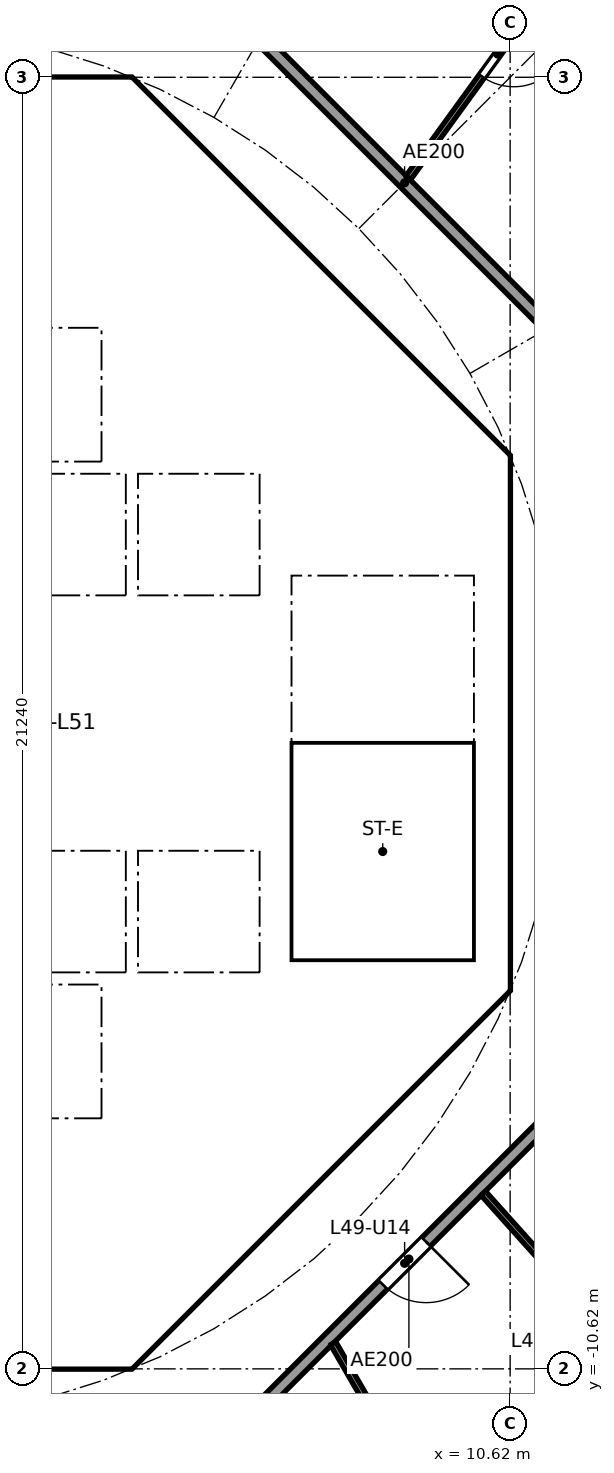
"""IFC4 building model, lengths in metres.
Left out: names, types, materials, properties, quantities, classifications, styles, units other than length and angle.
Written with IfcOpenShell. Run it as: python <this file> out.ifc"""

import sys

from ifc_helpers import new_model, si_unit, direction, frame, frame_2d, origin, place, context, subcontext, project, spatial, polyline, rectangle, outline, extrude, element, fill, save


model = new_model("IFC4")
c1 = context("Model", 3, precision=1e-05, world=origin(), true_north=direction((0.0, 1.0)))
c2 = subcontext(c1, "Body", "Model", "MODEL_VIEW")
j1 = project(units=[si_unit("LENGTHUNIT", "METRE"), si_unit("PLANEANGLEUNIT", "RADIAN")], contexts=[c1])
p1 = place(None, origin())
s1 = spatial("IfcSite", under=j1, at=p1, CompositionType="ELEMENT")
p2 = place(p1, origin())
s2 = spatial("IfcBuilding", under=s1, at=p2, CompositionType="ELEMENT")
p3 = place(p2, frame((0.0, 0.0, 195.5)))
s3 = spatial("IfcBuildingStorey", under=s2, at=p3, CompositionType="ELEMENT", Elevation=195.5)
p4 = place(p3, frame((9.988, 4.613, 0.0), z_axis=(0.0, 0.0, 1.0), x_axis=(-0.707106781187, 0.707106781187, 0.0)))
e1 = element("IfcWall", 1, at=p4, inside=s3, PredefinedType="SHEAR", context=c2, shape_type="SweptSolid", body=[
    extrude(rectangle(XDim=7.602, YDim=0.6, at=frame_2d((3.801, 0.0))), origin(), (0.0, 0.0, 1.0), 3.44),
])
p5 = place(p4, frame((3.201, 0.0, 0.0)))
e2 = element("IfcOpeningElement", 2, at=p5, cuts=e1, PredefinedType="OPENING", context=c2, shape_type="SweptSolid", body=[
    extrude(rectangle(XDim=1.2, YDim=2.1, at=frame_2d((0.6, 1.05))), frame((0.0, 0.31, 0.0), z_axis=(0.0, -1.0, 0.0), x_axis=(1.0, 0.0, 0.0)), (0.0, 0.0, 1.0), 0.62),
])
p6 = place(p3, frame((4.613, -9.988, 0.0), z_axis=(0.0, 0.0, 1.0), x_axis=(0.707106781187, 0.707106781187, 0.0)))
e3 = element("IfcWall", 3, at=p6, inside=s3, PredefinedType="SHEAR", context=c2, shape_type="SweptSolid", body=[
    extrude(rectangle(XDim=7.602, YDim=0.6, at=frame_2d((3.801, 0.0))), origin(), (0.0, 0.0, 1.0), 3.44),
])
p7 = place(p6, frame((3.201, 0.0, 0.0)))
e4 = element("IfcOpeningElement", 4, at=p7, cuts=e3, PredefinedType="OPENING", context=c2, shape_type="SweptSolid", body=[
    extrude(rectangle(XDim=1.2, YDim=2.1, at=frame_2d((0.6, 1.05))), frame((0.0, 0.31, 0.0), z_axis=(0.0, -1.0, 0.0), x_axis=(1.0, 0.0, 0.0)), (0.0, 0.0, 1.0), 0.62),
])
p8 = place(p3, frame((4.0, 4.3, 0.0), z_axis=(0.0, 0.0, 1.0), x_axis=(0.0, 1.0, 0.0)))
e5 = element("IfcWall", 5, at=p8, inside=s3, PredefinedType="SOLIDWALL", context=c2, shape_type="SweptSolid", body=[
    extrude(rectangle(XDim=2.2, YDim=0.2, at=frame_2d((1.1, 0.0))), origin(), (0.0, 0.0, 1.0), 3.44),
])
p9 = place(p8, frame((0.55, 0.0, 0.0)))
e6 = element("IfcOpeningElement", 6, at=p9, cuts=e5, PredefinedType="OPENING", context=c2, shape_type="SweptSolid", body=[
    extrude(rectangle(XDim=1.1, YDim=2.1, at=frame_2d((0.55, 1.05))), frame((0.0, 0.11, 0.0), z_axis=(0.0, -1.0, 0.0), x_axis=(1.0, 0.0, 0.0)), (0.0, 0.0, 1.0), 0.22),
])
p10 = place(p3, frame((-6.7, 2.0, 0.0), z_axis=(0.0, 0.0, 1.0), x_axis=(1.0, 0.0, 0.0)))
e7 = element("IfcWall", 7, at=p10, inside=s3, PredefinedType="SOLIDWALL", context=c2, shape_type="SweptSolid", body=[
    extrude(rectangle(XDim=13.4, YDim=0.2, at=frame_2d((6.7, 0.0))), origin(), (0.0, 0.0, 1.0), 3.44),
])
p11 = place(p10, frame((7.25, 0.0, 0.0)))
e8 = element("IfcOpeningElement", 8, at=p11, cuts=e7, PredefinedType="OPENING", context=c2, shape_type="SweptSolid", body=[
    extrude(rectangle(XDim=1.1, YDim=2.1, at=frame_2d((0.55, 1.05))), frame((0.0, 0.11, 0.0), z_axis=(0.0, -1.0, 0.0), x_axis=(1.0, 0.0, 0.0)), (0.0, 0.0, 1.0), 0.22),
])
p12 = place(p10, frame((9.45, 0.0, 0.0)))
e9 = element("IfcOpeningElement", 9, at=p12, cuts=e7, PredefinedType="OPENING", context=c2, shape_type="SweptSolid", body=[
    extrude(rectangle(XDim=1.1, YDim=2.1, at=frame_2d((0.55, 1.05))), frame((0.0, 0.11, 0.0), z_axis=(0.0, -1.0, 0.0), x_axis=(1.0, 0.0, 0.0)), (0.0, 0.0, 1.0), 0.22),
])
p13 = place(p10, frame((2.95, 0.0, 0.0)))
e10 = element("IfcOpeningElement", 10, at=p13, cuts=e7, PredefinedType="OPENING", context=c2, shape_type="SweptSolid", body=[
    extrude(rectangle(XDim=0.9, YDim=2.1, at=frame_2d((0.45, 1.05))), frame((0.0, 0.11, 0.0), z_axis=(0.0, -1.0, 0.0), x_axis=(1.0, 0.0, 0.0)), (0.0, 0.0, 1.0), 0.22),
])
p14 = place(p3, frame((6.7, 4.0, 0.0), z_axis=(0.0, 0.0, 1.0), x_axis=(1.0, 0.0, 0.0)))
e11 = element("IfcWall", 11, at=p14, inside=s3, PredefinedType="SOLIDWALL", context=c2, shape_type="SweptSolid", body=[
    extrude(rectangle(XDim=3.325, YDim=0.2, at=frame_2d((1.662, 0.0))), origin(), (0.0, 0.0, 1.0), 3.44),
])
p15 = place(p14, frame((1.25, 0.0, 0.0)))
e12 = element("IfcOpeningElement", 12, at=p15, cuts=e11, PredefinedType="OPENING", context=c2, shape_type="SweptSolid", body=[
    extrude(rectangle(XDim=1.1, YDim=2.1, at=frame_2d((0.55, 1.05))), frame((0.0, 0.11, 0.0), z_axis=(0.0, -1.0, 0.0), x_axis=(1.0, 0.0, 0.0)), (0.0, 0.0, 1.0), 0.22),
])
p16 = place(p3, frame((4.0, 7.025, 0.0), z_axis=(0.0, 0.0, 1.0), x_axis=(0.0, 1.0, 0.0)))
e13 = element("IfcWall", 13, at=p16, inside=s3, PredefinedType="SOLIDWALL", context=c2, shape_type="SweptSolid", body=[
    extrude(rectangle(XDim=3.0, YDim=0.2, at=frame_2d((1.5, 0.0))), origin(), (0.0, 0.0, 1.0), 3.44),
])
p17 = place(p16, frame((0.925, 0.0, 0.0)))
e14 = element("IfcOpeningElement", 14, at=p17, cuts=e13, PredefinedType="OPENING", context=c2, shape_type="SweptSolid", body=[
    extrude(rectangle(XDim=1.1, YDim=2.1, at=frame_2d((0.55, 1.05))), frame((0.0, 0.11, 0.0), z_axis=(0.0, -1.0, 0.0), x_axis=(1.0, 0.0, 0.0)), (0.0, 0.0, 1.0), 0.22),
])
p18 = place(p3, frame((4.0, -10.025, 0.0), z_axis=(0.0, 0.0, 1.0), x_axis=(0.0, 1.0, 0.0)))
e15 = element("IfcWall", 15, at=p18, inside=s3, PredefinedType="SOLIDWALL", context=c2, shape_type="SweptSolid", body=[
    extrude(rectangle(XDim=3.0, YDim=0.2, at=frame_2d((1.5, 0.0))), origin(), (0.0, 0.0, 1.0), 3.44),
])
p19 = place(p18, frame((0.975, 0.0, 0.0)))
e16 = element("IfcOpeningElement", 16, at=p19, cuts=e15, PredefinedType="OPENING", context=c2, shape_type="SweptSolid", body=[
    extrude(rectangle(XDim=1.1, YDim=2.1, at=frame_2d((0.55, 1.05))), frame((0.0, 0.11, 0.0), z_axis=(0.0, -1.0, 0.0), x_axis=(1.0, 0.0, 0.0)), (0.0, 0.0, 1.0), 0.22),
])
p20 = place(p3, frame((4.0, -6.5, 0.0), z_axis=(0.0, 0.0, 1.0), x_axis=(0.0, 1.0, 0.0)))
e17 = element("IfcWall", 17, at=p20, inside=s3, PredefinedType="SOLIDWALL", context=c2, shape_type="SweptSolid", body=[
    extrude(rectangle(XDim=2.2, YDim=0.2, at=frame_2d((1.1, 0.0))), origin(), (0.0, 0.0, 1.0), 3.44),
])
p21 = place(p20, frame((0.55, 0.0, 0.0)))
e18 = element("IfcOpeningElement", 18, at=p21, cuts=e17, PredefinedType="OPENING", context=c2, shape_type="SweptSolid", body=[
    extrude(rectangle(XDim=1.1, YDim=2.1, at=frame_2d((0.55, 1.05))), frame((0.0, 0.11, 0.0), z_axis=(0.0, -1.0, 0.0), x_axis=(1.0, 0.0, 0.0)), (0.0, 0.0, 1.0), 0.22),
])
p22 = place(p3, frame((-6.7, -2.0, 0.0), z_axis=(0.0, 0.0, 1.0), x_axis=(1.0, 0.0, 0.0)))
e19 = element("IfcWall", 19, at=p22, inside=s3, PredefinedType="SOLIDWALL", context=c2, shape_type="SweptSolid", body=[
    extrude(rectangle(XDim=13.4, YDim=0.2, at=frame_2d((6.7, 0.0))), origin(), (0.0, 0.0, 1.0), 3.44),
])
p23 = place(p22, frame((5.05, 0.0, 0.0)))
e20 = element("IfcOpeningElement", 20, at=p23, cuts=e19, PredefinedType="OPENING", context=c2, shape_type="SweptSolid", body=[
    extrude(rectangle(XDim=1.1, YDim=2.1, at=frame_2d((0.55, 1.05))), frame((0.0, 0.11, 0.0), z_axis=(0.0, -1.0, 0.0), x_axis=(1.0, 0.0, 0.0)), (0.0, 0.0, 1.0), 0.22),
])
p24 = place(p22, frame((7.25, 0.0, 0.0)))
e21 = element("IfcOpeningElement", 21, at=p24, cuts=e19, PredefinedType="OPENING", context=c2, shape_type="SweptSolid", body=[
    extrude(rectangle(XDim=1.1, YDim=2.1, at=frame_2d((0.55, 1.05))), frame((0.0, 0.11, 0.0), z_axis=(0.0, -1.0, 0.0), x_axis=(1.0, 0.0, 0.0)), (0.0, 0.0, 1.0), 0.22),
])
p25 = place(p22, frame((0.75, 0.0, 0.0)))
e22 = element("IfcOpeningElement", 22, at=p25, cuts=e19, PredefinedType="OPENING", context=c2, shape_type="SweptSolid", body=[
    extrude(rectangle(XDim=0.9, YDim=2.1, at=frame_2d((0.45, 1.05))), frame((0.0, 0.11, 0.0), z_axis=(0.0, -1.0, 0.0), x_axis=(1.0, 0.0, 0.0)), (0.0, 0.0, 1.0), 0.22),
])
p26 = place(p22, frame((2.95, 0.0, 0.0)))
e23 = element("IfcOpeningElement", 23, at=p26, cuts=e19, PredefinedType="OPENING", context=c2, shape_type="SweptSolid", body=[
    extrude(rectangle(XDim=0.9, YDim=2.1, at=frame_2d((0.45, 1.05))), frame((0.0, 0.11, 0.0), z_axis=(0.0, -1.0, 0.0), x_axis=(1.0, 0.0, 0.0)), (0.0, 0.0, 1.0), 0.22),
])
p27 = place(p3, origin())
e24 = element("IfcWall", 24, at=p27, inside=s3, PredefinedType="SHEAR", context=c2, shape_type="SweptSolid", body=[
    extrude(outline(polyline([(-4.152, -10.025), (4.152, -10.025), (4.401, -9.776), (4.825, -10.2), (4.401, -10.625), (-4.401, -10.625), (-4.825, -10.2), (-4.401, -9.776), (-4.152, -10.025)])), origin(), (0.0, 0.0, 1.0), 3.44),
])
p28 = place(p3, origin())
e25 = element("IfcWall", 25, at=p28, inside=s3, PredefinedType="SHEAR", context=c2, shape_type="SweptSolid", body=[
    extrude(outline(polyline([(-4.152, 10.025), (-4.401, 9.776), (-4.825, 10.2), (-4.401, 10.625), (4.401, 10.625), (4.825, 10.2), (4.401, 9.776), (4.152, 10.025), (-4.152, 10.025)])), origin(), (0.0, 0.0, 1.0), 3.44),
])
p29 = place(p3, origin())
e26 = element("IfcWall", 26, at=p29, inside=s3, PredefinedType="SHEAR", context=c2, shape_type="SweptSolid", body=[
    extrude(outline(polyline([(9.776, -4.401), (10.025, -4.152), (10.025, -3.801), (10.025, 4.152), (9.776, 4.401), (10.2, 4.825), (10.625, 4.401), (10.625, -4.401), (10.2, -4.825), (9.776, -4.401)])), origin(), (0.0, 0.0, 1.0), 3.44),
])
p30 = place(p3, origin())
e27 = element("IfcWall", 27, at=p30, inside=s3, PredefinedType="SOLIDWALL", context=c2, shape_type="SweptSolid", body=[
    extrude(outline(polyline([(-6.7, -2.1), (-6.5, -2.1), (-6.5, -4.1), (-4.5, -4.1), (-4.5, -2.1), (-4.3, -2.1), (-4.3, -4.1), (-2.3, -4.1), (-2.3, -2.1), (-2.1, -2.1), (-2.1, -4.1), (-0.1, -4.1), (-0.1, -2.1), (0.1, -2.1), (0.1, -4.1), (2.1, -4.1), (2.1, -2.1), (2.3, -2.1), (2.3, -4.1), (4.3, -4.1), (4.3, -2.1), (4.5, -2.1), (4.5, -4.1), (6.5, -4.1), (6.5, -2.1), (6.7, -2.1), (6.7, -4.3), (-6.7, -4.3), (-6.7, -2.1)])), origin(), (0.0, 0.0, 1.0), 3.44),
])
p31 = place(p3, origin())
e28 = element("IfcWall", 28, at=p31, inside=s3, PredefinedType="SOLIDWALL", context=c2, shape_type="SweptSolid", body=[
    extrude(outline(polyline([(-6.7, 4.3), (6.7, 4.3), (6.7, 2.1), (6.5, 2.1), (6.5, 4.1), (4.5, 4.1), (4.5, 2.1), (4.3, 2.1), (4.3, 4.1), (2.3, 4.1), (2.3, 2.1), (2.1, 2.1), (2.1, 4.1), (0.1, 4.1), (0.1, 2.1), (-0.1, 2.1), (-0.1, 4.1), (-6.5, 4.1), (-6.5, 2.1), (-6.7, 2.1), (-6.7, 4.3)])), origin(), (0.0, 0.0, 1.0), 3.44),
])
p32 = place(p3, origin())
e29 = element("IfcWall", 29, at=p32, inside=s3, PredefinedType="SOLIDWALL", context=c2, shape_type="SweptSolid", body=[
    extrude(outline(polyline([(4.1, -7.025), (-4.1, -7.025), (-4.1, -6.5), (4.1, -6.5), (4.1, -7.025)])), origin(), (0.0, 0.0, 1.0), 3.44),
])
p33 = place(p3, origin())
e30 = element("IfcWall", 30, at=p33, inside=s3, PredefinedType="SOLIDWALL", context=c2, shape_type="SweptSolid", body=[
    extrude(outline(polyline([(4.1, 6.5), (-4.1, 6.5), (-4.1, 7.025), (4.1, 7.025), (4.1, 6.5)])), origin(), (0.0, 0.0, 1.0), 3.44),
])
p34 = place(p3, origin())
e31 = element("IfcWall", 31, at=p34, inside=s3, PredefinedType="SOLIDWALL", context=c2, shape_type="SweptSolid", body=[
    extrude(outline(polyline([(7.025, -3.9), (6.7, -3.9), (6.7, 3.9), (7.025, 3.9), (7.025, -3.9)])), origin(), (0.0, 0.0, 1.0), 3.44),
])
p35 = place(p3, origin())
e32 = element("IfcWall", 32, at=p35, inside=s3, PredefinedType="SOLIDWALL", context=c2, shape_type="SweptSolid", body=[
    extrude(outline(polyline([(10.025, -4.1), (6.7, -4.1), (6.7, -3.9), (10.025, -3.9), (10.025, -4.1)])), origin(), (0.0, 0.0, 1.0), 3.44),
])
p36 = place(p3, frame((12.635, 5.134, 0.0), z_axis=(0.0, 0.0, 1.0), x_axis=(-0.707106781187, 0.707106781187, 0.0)))
e33 = element("IfcWall", 33, at=p36, inside=s3, PredefinedType="PARTITIONING", context=c2, shape_type="SweptSolid", body=[
    extrude(rectangle(XDim=10.609, YDim=0.2, at=frame_2d((5.305, 0.0))), origin(), (0.0, 0.0, 1.0), 3.44),
])
p37 = place(p3, frame((5.275, -12.494, 0.0), z_axis=(0.0, 0.0, 1.0), x_axis=(0.707106781187, 0.707106781187, 0.0)))
e34 = element("IfcWall", 34, at=p37, inside=s3, PredefinedType="PARTITIONING", context=c2, shape_type="SweptSolid", body=[
    extrude(rectangle(XDim=10.409, YDim=0.2, at=frame_2d((5.205, 0.0))), origin(), (0.0, 0.0, 1.0), 3.44),
])
p38 = place(p37, frame((4.604, 0.0, 0.0)))
e35 = element("IfcOpeningElement", 35, at=p38, cuts=e34, PredefinedType="OPENING", context=c2, shape_type="SweptSolid", body=[
    extrude(rectangle(XDim=1.0, YDim=2.1, at=frame_2d((0.5, 1.05))), frame((0.0, 0.11, 0.0), z_axis=(0.0, -1.0, 0.0), x_axis=(1.0, 0.0, 0.0)), (0.0, 0.0, 1.0), 0.22),
])
p39 = place(p3, frame((8.943, 8.966, 0.0), z_axis=(0.0, 0.0, 1.0), x_axis=(0.586803608919, 0.809729290912, 0.0)))
e36 = element("IfcWall", 36, at=p39, inside=s3, PredefinedType="PARTITIONING", context=c2, shape_type="SweptSolid", body=[
    extrude(rectangle(XDim=17.179, YDim=0.1, at=frame_2d((8.589, 0.0))), origin(), (0.0, 0.0, 1.0), 2.756),
])
p40 = place(p39, frame((2.062, 0.0, 0.0)))
e37 = element("IfcOpeningElement", 37, at=p40, cuts=e36, PredefinedType="OPENING", context=c2, shape_type="SweptSolid", body=[
    extrude(rectangle(XDim=0.9, YDim=2.1, at=frame_2d((0.45, 1.05))), frame((0.0, 0.06, 0.0), z_axis=(0.0, -1.0, 0.0), x_axis=(1.0, 0.0, 0.0)), (0.0, 0.0, 1.0), 0.12),
])
p41 = place(p39, frame((7.308, 0.0, 0.0)))
e38 = element("IfcOpeningElement", 38, at=p41, cuts=e36, PredefinedType="OPENING", context=c2, shape_type="SweptSolid", body=[
    extrude(rectangle(XDim=0.9, YDim=2.1, at=frame_2d((0.45, 1.05))), frame((0.0, 0.06, 0.0), z_axis=(0.0, -1.0, 0.0), x_axis=(1.0, 0.0, 0.0)), (0.0, 0.0, 1.0), 0.12),
])
p42 = place(p3, frame((7.708, -10.198, 0.0), z_axis=(0.0, 0.0, 1.0), x_axis=(0.501288100085, -0.865280440501, 0.0)))
e39 = element("IfcWall", 39, at=p42, inside=s3, PredefinedType="PARTITIONING", context=c2, shape_type="SweptSolid", body=[
    extrude(rectangle(XDim=10.623, YDim=0.1, at=frame_2d((5.312, 0.0))), origin(), (0.0, 0.0, 1.0), 2.756),
])
p43 = place(p42, frame((2.082, 0.0, 0.0)))
e40 = element("IfcOpeningElement", 40, at=p43, cuts=e39, PredefinedType="OPENING", context=c2, shape_type="SweptSolid", body=[
    extrude(rectangle(XDim=0.9, YDim=2.1, at=frame_2d((0.45, 1.05))), frame((0.0, 0.06, 0.0), z_axis=(0.0, -1.0, 0.0), x_axis=(1.0, 0.0, 0.0)), (0.0, 0.0, 1.0), 0.12),
])
p44 = place(p42, frame((7.369, 0.0, 0.0)))
e41 = element("IfcOpeningElement", 41, at=p44, cuts=e39, PredefinedType="OPENING", context=c2, shape_type="SweptSolid", body=[
    extrude(rectangle(XDim=0.9, YDim=2.1, at=frame_2d((0.45, 1.05))), frame((0.0, 0.06, 0.0), z_axis=(0.0, -1.0, 0.0), x_axis=(1.0, 0.0, 0.0)), (0.0, 0.0, 1.0), 0.12),
])
p45 = place(p3, frame((10.178, -7.732, 0.0), z_axis=(0.0, 0.0, 1.0), x_axis=(0.667283629999, -0.74480370376, 0.0)))
e42 = element("IfcWall", 42, at=p45, inside=s3, PredefinedType="PARTITIONING", context=c2, shape_type="SweptSolid", body=[
    extrude(rectangle(XDim=15.983, YDim=0.1, at=frame_2d((7.992, 0.0))), origin(), (0.0, 0.0, 1.0), 2.756),
])
p46 = place(p45, frame((2.07, 0.0, 0.0)))
e43 = element("IfcOpeningElement", 43, at=p46, cuts=e42, PredefinedType="OPENING", context=c2, shape_type="SweptSolid", body=[
    extrude(rectangle(XDim=0.9, YDim=2.1, at=frame_2d((0.45, 1.05))), frame((0.0, 0.06, 0.0), z_axis=(0.0, -1.0, 0.0), x_axis=(1.0, 0.0, 0.0)), (0.0, 0.0, 1.0), 0.12),
])
p47 = place(p45, frame((7.331, 0.0, 0.0)))
e44 = element("IfcOpeningElement", 44, at=p47, cuts=e42, PredefinedType="OPENING", context=c2, shape_type="SweptSolid", body=[
    extrude(rectangle(XDim=0.9, YDim=2.1, at=frame_2d((0.45, 1.05))), frame((0.0, 0.06, 0.0), z_axis=(0.0, -1.0, 0.0), x_axis=(1.0, 0.0, 0.0)), (0.0, 0.0, 1.0), 0.12),
])
p48 = place(p45, frame((12.802, 0.0, 0.0)))
e45 = element("IfcOpeningElement", 45, at=p48, cuts=e42, PredefinedType="OPENING", context=c2, shape_type="SweptSolid", body=[
    extrude(rectangle(XDim=0.9, YDim=2.1, at=frame_2d((0.45, 1.05))), frame((0.0, 0.06, 0.0), z_axis=(0.0, -1.0, 0.0), x_axis=(1.0, 0.0, 0.0)), (0.0, 0.0, 1.0), 0.12),
])
p49 = place(p12, origin())
e46 = element("IfcDoor", 46, at=p49, inside=s3, OperationType="DOUBLE_DOOR_SLIDING", PredefinedType="DOOR", context=c2, shape_type="SweptSolid", body=[
    extrude(rectangle(XDim=1.1, YDim=2.1, at=frame_2d((0.55, 1.05))), frame((0.0, 0.025, 0.0), z_axis=(0.0, -1.0, 0.0), x_axis=(1.0, 0.0, 0.0)), (0.0, 0.0, 1.0), 0.05),
])
fill(e9, e46)
p50 = place(p9, origin())
e47 = element("IfcDoor", 47, at=p50, inside=s3, OperationType="DOUBLE_DOOR_SLIDING", PredefinedType="DOOR", context=c2, shape_type="SweptSolid", body=[
    extrude(rectangle(XDim=1.1, YDim=2.1, at=frame_2d((0.55, 1.05))), frame((0.0, 0.025, 0.0), z_axis=(0.0, -1.0, 0.0), x_axis=(1.0, 0.0, 0.0)), (0.0, 0.0, 1.0), 0.05),
])
fill(e6, e47)
p51 = place(p21, origin())
e48 = element("IfcDoor", 48, at=p51, inside=s3, OperationType="DOUBLE_DOOR_SLIDING", PredefinedType="DOOR", context=c2, shape_type="SweptSolid", body=[
    extrude(rectangle(XDim=1.1, YDim=2.1, at=frame_2d((0.55, 1.05))), frame((0.0, 0.025, 0.0), z_axis=(0.0, -1.0, 0.0), x_axis=(1.0, 0.0, 0.0)), (0.0, 0.0, 1.0), 0.05),
])
fill(e18, e48)
p52 = place(p15, frame((1.1, 0.0, 0.0), x_axis=(-1.0, 0.0, 0.0)))
e49 = element("IfcDoor", 49, at=p52, inside=s3, OperationType="SINGLE_SWING_LEFT", PredefinedType="DOOR", context=c2, shape_type="SweptSolid", body=[
    extrude(rectangle(XDim=1.1, YDim=2.1, at=frame_2d((0.55, 1.05))), frame((0.0, 0.025, 0.0), z_axis=(0.0, -1.0, 0.0), x_axis=(1.0, 0.0, 0.0)), (0.0, 0.0, 1.0), 0.05),
])
fill(e12, e49)
p53 = place(p17, origin())
e50 = element("IfcDoor", 50, at=p53, inside=s3, OperationType="SINGLE_SWING_RIGHT", PredefinedType="DOOR", context=c2, shape_type="SweptSolid", body=[
    extrude(rectangle(XDim=1.1, YDim=2.1, at=frame_2d((0.55, 1.05))), frame((0.0, 0.025, 0.0), z_axis=(0.0, -1.0, 0.0), x_axis=(1.0, 0.0, 0.0)), (0.0, 0.0, 1.0), 0.05),
])
fill(e14, e50)
p54 = place(p19, origin())
e51 = element("IfcDoor", 51, at=p54, inside=s3, OperationType="SINGLE_SWING_LEFT", PredefinedType="DOOR", context=c2, shape_type="SweptSolid", body=[
    extrude(rectangle(XDim=1.1, YDim=2.1, at=frame_2d((0.55, 1.05))), frame((0.0, 0.025, 0.0), z_axis=(0.0, -1.0, 0.0), x_axis=(1.0, 0.0, 0.0)), (0.0, 0.0, 1.0), 0.05),
])
fill(e16, e51)
p55 = place(p5, origin())
e52 = element("IfcDoor", 52, at=p55, inside=s3, OperationType="SINGLE_SWING_RIGHT", PredefinedType="DOOR", context=c2, shape_type="SweptSolid", body=[
    extrude(rectangle(XDim=1.2, YDim=2.1, at=frame_2d((0.6, 1.05))), frame((0.0, 0.025, 0.0), z_axis=(0.0, -1.0, 0.0), x_axis=(1.0, 0.0, 0.0)), (0.0, 0.0, 1.0), 0.05),
])
fill(e2, e52)
p56 = place(p7, origin())
e53 = element("IfcDoor", 53, at=p56, inside=s3, OperationType="SINGLE_SWING_RIGHT", PredefinedType="DOOR", context=c2, shape_type="SweptSolid", body=[
    extrude(rectangle(XDim=1.2, YDim=2.1, at=frame_2d((0.6, 1.05))), frame((0.0, 0.025, 0.0), z_axis=(0.0, -1.0, 0.0), x_axis=(1.0, 0.0, 0.0)), (0.0, 0.0, 1.0), 0.05),
])
fill(e4, e53)
p57 = place(p38, frame((1.0, 0.0, 0.0), x_axis=(-1.0, 0.0, 0.0)))
e54 = element("IfcDoor", 54, at=p57, inside=s3, OperationType="SINGLE_SWING_LEFT", PredefinedType="DOOR", context=c2, shape_type="SweptSolid", body=[
    extrude(rectangle(XDim=1.0, YDim=2.1, at=frame_2d((0.5, 1.05))), frame((0.0, 0.025, 0.0), z_axis=(0.0, -1.0, 0.0), x_axis=(1.0, 0.0, 0.0)), (0.0, 0.0, 1.0), 0.05),
])
fill(e35, e54)
p58 = place(p40, frame((0.9, 0.0, 0.0), x_axis=(-1.0, 0.0, 0.0)))
e55 = element("IfcDoor", 55, at=p58, inside=s3, OperationType="SINGLE_SWING_LEFT", PredefinedType="DOOR", context=c2, shape_type="SweptSolid", body=[
    extrude(rectangle(XDim=0.9, YDim=2.1, at=frame_2d((0.45, 1.05))), frame((0.0, 0.025, 0.0), z_axis=(0.0, -1.0, 0.0), x_axis=(1.0, 0.0, 0.0)), (0.0, 0.0, 1.0), 0.05),
])
fill(e37, e55)
save(model, sys.argv[1])
